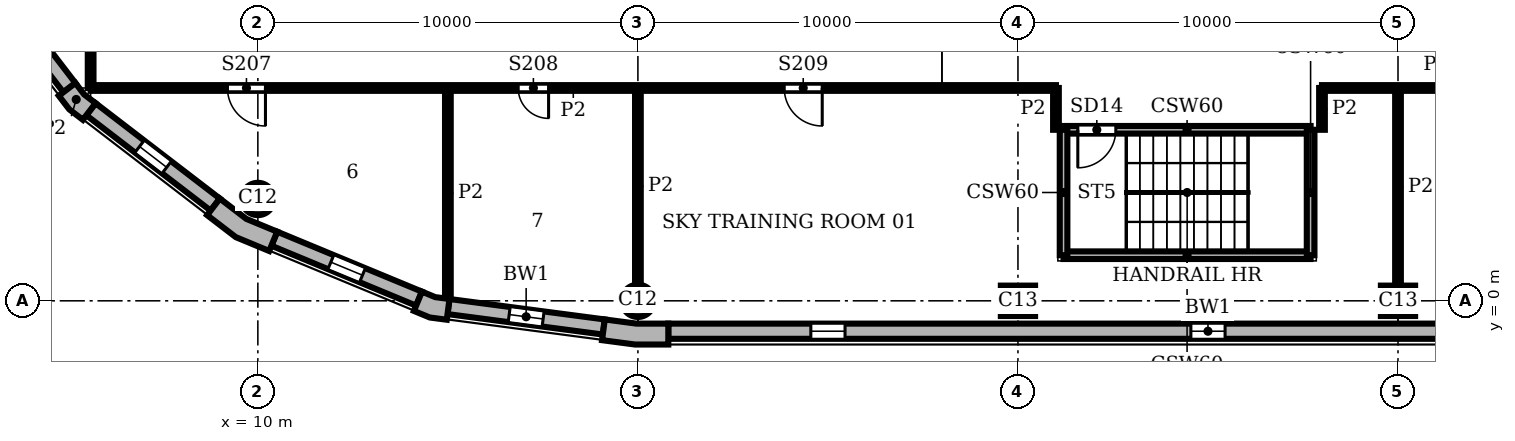
"""IFC4 building model, lengths in metres.
Left out: names, types, materials, properties, quantities, classifications, styles, units other than length and angle.
Written with IfcOpenShell. Run it as: python <this file> out.ifc"""

import sys

from ifc_helpers import new_model, si_unit, direction, frame, frame_2d, origin, origin_2d, place, context, subcontext, project, spatial, polyline, rectangle, circle, outline, extrude, element, fill, save


model = new_model("IFC4")
c1 = context("Model", 3, precision=1e-05, world=origin(), true_north=direction((0.0, 1.0)))
c2 = subcontext(c1, "Body", "Model", "MODEL_VIEW")
j1 = project(units=[si_unit("LENGTHUNIT", "METRE"), si_unit("PLANEANGLEUNIT", "RADIAN")], contexts=[c1])
p1 = place(None, origin())
s1 = spatial("IfcSite", under=j1, at=p1, CompositionType="ELEMENT")
p2 = place(p1, origin())
s2 = spatial("IfcBuilding", under=s1, at=p2, CompositionType="ELEMENT")
p3 = place(p2, frame((0.0, 0.0, 246.0)))
s3 = spatial("IfcBuildingStorey", under=s2, at=p3, CompositionType="ELEMENT", Elevation=246.0)
p4 = place(p3, frame((20.0, 0.0, 0.0), z_axis=(0.0, 0.0, 1.0), x_axis=(1.0, 0.0, 0.0)))
e1 = element("IfcColumn", 1, at=p4, inside=s3, PredefinedType="COLUMN", context=c2, shape_type="SweptSolid", body=[
    extrude(circle(Radius=0.425, at=origin_2d()), origin(), (0.0, 0.0, 1.0), 5.4),
])
for number, where, z_axis, x_axis in (
    (2, (30.0, 0.0, 0.0), (0.0, 0.0, 1.0), (1.0, 0.0, 0.0)),
    (3, (40.0, 0.0, 0.0), (0.0, 0.0, 1.0), (1.0, 0.0, 0.0)),
):
    element("IfcColumn", number, at=place(p3, frame(where, z_axis=z_axis, x_axis=x_axis)), inside=s3, PredefinedType="COLUMN", context=c2, shape_type="SweptSolid", body=[
        extrude(rectangle(XDim=0.9, YDim=0.8, at=origin_2d()), origin(), (0.0, 0.0, 1.0), 5.4),
    ])
p5 = place(p3, frame((10.0, 2.679, 0.0), z_axis=(0.0, 0.0, 1.0), x_axis=(1.0, 0.0, 0.0)))
e4 = element("IfcColumn", 4, at=p5, inside=s3, PredefinedType="COLUMN", context=c2, shape_type="SweptSolid", body=[
    extrude(circle(Radius=0.425, at=origin_2d()), origin(), (0.0, 0.0, 1.0), 5.4),
])
p6 = place(p3, origin())
e5 = element("IfcWall", 5, at=p6, inside=s3, PredefinedType="SOLIDWALL", context=c2, shape_type="SweptSolid", body=[
    extrude(outline(polyline([(19.076, -0.887), (19.057, -1.036), (19.925, -1.15), (20.8, -1.15), (20.8, -1.0), (20.8, -0.6), (19.961, -0.6), (19.128, -0.49), (19.076, -0.887)])), origin(), (0.0, 0.0, 1.0), 5.4),
])
e6 = element("IfcWall", 6, at=p6, inside=s3, PredefinedType="SOLIDWALL", context=c2, shape_type="SweptSolid", body=[
    extrude(outline(polyline([(4.882, 5.487), (4.763, 5.396), (5.038, 5.038), (5.396, 4.763), (5.487, 4.882), (5.731, 5.199), (5.43, 5.43), (5.199, 5.731), (4.882, 5.487)])), origin(), (0.0, 0.0, 1.0), 5.4),
])
e7 = element("IfcWall", 7, at=p6, inside=s3, PredefinedType="SOLIDWALL", context=c2, shape_type="SweptSolid", body=[
    extrude(outline(polyline([(8.757, 2.373), (8.665, 2.254), (9.42, 1.675), (10.299, 1.311), (10.356, 1.449), (10.51, 1.819), (9.698, 2.155), (9.0, 2.69), (8.757, 2.373)])), origin(), (0.0, 0.0, 1.0), 5.4),
])
e8 = element("IfcWall", 8, at=p6, inside=s3, PredefinedType="SOLIDWALL", context=c2, shape_type="SweptSolid", body=[
    extrude(outline(polyline([(14.164, -0.128), (14.106, -0.266), (14.523, -0.439), (14.971, -0.498), (14.99, -0.349), (15.043, 0.047), (14.667, 0.097), (14.317, 0.242), (14.164, -0.128)])), origin(), (0.0, 0.0, 1.0), 5.4),
])
p7 = place(p3, frame((20.8, -0.8, 0.0), z_axis=(0.0, 0.0, 1.0), x_axis=(1.0, 0.0, 0.0)))
e9 = element("IfcWall", 9, at=p7, inside=s3, PredefinedType="SOLIDWALL", context=c2, shape_type="SweptSolid", body=[
    extrude(rectangle(XDim=28.4, YDim=0.4, at=frame_2d((14.2, 0.0))), origin(), (0.0, 0.0, 1.0), 5.4),
])
p8 = place(p7, frame((3.75, 0.0, 0.9)))
e10 = element("IfcOpeningElement", 10, at=p8, cuts=e9, PredefinedType="OPENING", context=c2, shape_type="SweptSolid", body=[
    extrude(rectangle(XDim=0.9, YDim=3.4, at=frame_2d((0.45, 1.7))), frame((0.0, 0.21, 0.0), z_axis=(0.0, -1.0, 0.0), x_axis=(1.0, 0.0, 0.0)), (0.0, 0.0, 1.0), 0.42),
])
p9 = place(p7, frame((13.75, 0.0, 0.9)))
e11 = element("IfcOpeningElement", 11, at=p9, cuts=e9, PredefinedType="OPENING", context=c2, shape_type="SweptSolid", body=[
    extrude(rectangle(XDim=0.9, YDim=3.4, at=frame_2d((0.45, 1.7))), frame((0.0, 0.21, 0.0), z_axis=(0.0, -1.0, 0.0), x_axis=(1.0, 0.0, 0.0)), (0.0, 0.0, 1.0), 0.42),
])
p10 = place(p7, frame((23.75, 0.0, 0.9)))
e12 = element("IfcOpeningElement", 12, at=p10, cuts=e9, PredefinedType="OPENING", context=c2, shape_type="SweptSolid", body=[
    extrude(rectangle(XDim=0.9, YDim=3.4, at=frame_2d((0.45, 1.7))), frame((0.0, 0.21, 0.0), z_axis=(0.0, -1.0, 0.0), x_axis=(1.0, 0.0, 0.0)), (0.0, 0.0, 1.0), 0.42),
])
p11 = place(p3, frame((2.532, 8.878, 0.0), z_axis=(0.0, 0.0, 1.0), x_axis=(0.608759824817, -0.793354571229, 0.0)))
e13 = element("IfcWall", 13, at=p11, inside=s3, PredefinedType="SOLIDWALL", context=c2, shape_type="SweptSolid", body=[
    extrude(rectangle(XDim=4.121, YDim=0.4, at=frame_2d((2.061, 0.0))), origin(), (0.0, 0.0, 1.0), 5.4),
])
p12 = place(p11, frame((1.611, 0.0, 0.9)))
e14 = element("IfcOpeningElement", 14, at=p12, cuts=e13, PredefinedType="OPENING", context=c2, shape_type="SweptSolid", body=[
    extrude(rectangle(XDim=0.9, YDim=3.4, at=frame_2d((0.45, 1.7))), frame((0.0, 0.21, 0.0), z_axis=(0.0, -1.0, 0.0), x_axis=(1.0, 0.0, 0.0)), (0.0, 0.0, 1.0), 0.42),
])
p13 = place(p3, frame((5.609, 5.041, 0.0), z_axis=(0.0, 0.0, 1.0), x_axis=(0.793354571229, -0.608759824817, 0.0)))
e15 = element("IfcWall", 15, at=p13, inside=s3, PredefinedType="SOLIDWALL", context=c2, shape_type="SweptSolid", body=[
    extrude(rectangle(XDim=4.121, YDim=0.4, at=frame_2d((2.061, 0.0))), origin(), (0.0, 0.0, 1.0), 5.4),
])
p14 = place(p13, frame((1.611, 0.0, 0.9)))
e16 = element("IfcOpeningElement", 16, at=p14, cuts=e15, PredefinedType="OPENING", context=c2, shape_type="SweptSolid", body=[
    extrude(rectangle(XDim=0.9, YDim=3.4, at=frame_2d((0.45, 1.7))), frame((0.0, 0.21, 0.0), z_axis=(0.0, -1.0, 0.0), x_axis=(1.0, 0.0, 0.0)), (0.0, 0.0, 1.0), 0.42),
])
p15 = place(p3, frame((10.433, 1.634, 0.0), z_axis=(0.0, 0.0, 1.0), x_axis=(0.923863744394, -0.382721546029, 0.0)))
e17 = element("IfcWall", 17, at=p15, inside=s3, PredefinedType="SOLIDWALL", context=c2, shape_type="SweptSolid", body=[
    extrude(rectangle(XDim=4.121, YDim=0.4, at=frame_2d((2.061, 0.0))), origin(), (0.0, 0.0, 1.0), 5.4),
])
p16 = place(p15, frame((1.611, 0.0, 0.9)))
e18 = element("IfcOpeningElement", 18, at=p16, cuts=e17, PredefinedType="OPENING", context=c2, shape_type="SweptSolid", body=[
    extrude(rectangle(XDim=0.9, YDim=3.4, at=frame_2d((0.45, 1.7))), frame((0.0, 0.21, 0.0), z_axis=(0.0, -1.0, 0.0), x_axis=(1.0, 0.0, 0.0)), (0.0, 0.0, 1.0), 0.42),
])
p17 = place(p3, frame((15.017, -0.151, 0.0), z_axis=(0.0, 0.0, 1.0), x_axis=(0.991446429508, -0.130514280502, 0.0)))
e19 = element("IfcWall", 19, at=p17, inside=s3, PredefinedType="SOLIDWALL", context=c2, shape_type="SweptSolid", body=[
    extrude(rectangle(XDim=4.121, YDim=0.4, at=frame_2d((2.061, 0.0))), origin(), (0.0, 0.0, 1.0), 5.4),
])
p18 = place(p17, frame((1.611, 0.0, 0.9)))
e20 = element("IfcOpeningElement", 20, at=p18, cuts=e19, PredefinedType="OPENING", context=c2, shape_type="SweptSolid", body=[
    extrude(rectangle(XDim=0.9, YDim=3.4, at=frame_2d((0.45, 1.7))), frame((0.0, 0.21, 0.0), z_axis=(0.0, -1.0, 0.0), x_axis=(1.0, 0.0, 0.0)), (0.0, 0.0, 1.0), 0.42),
])
p19 = place(p3, frame((31.2, 1.2, 0.0), z_axis=(0.0, 0.0, 1.0), x_axis=(1.0, 0.0, 0.0)))
e21 = element("IfcWall", 21, at=p19, inside=s3, PredefinedType="SHEAR", context=c2, shape_type="SweptSolid", body=[
    extrude(rectangle(XDim=6.5, YDim=0.2, at=frame_2d((3.25, 0.0))), origin(), (0.0, 0.0, 1.0), 5.08),
])
p20 = place(p3, frame((31.2, 4.5, 0.0), z_axis=(0.0, 0.0, 1.0), x_axis=(1.0, 0.0, 0.0)))
e22 = element("IfcWall", 22, at=p20, inside=s3, PredefinedType="SHEAR", context=c2, shape_type="SweptSolid", body=[
    extrude(rectangle(XDim=6.5, YDim=0.2, at=frame_2d((3.25, 0.0))), origin(), (0.0, 0.0, 1.0), 5.08),
])
p21 = place(p20, frame((0.375, 0.0, 0.0)))
e23 = element("IfcOpeningElement", 23, at=p21, cuts=e22, PredefinedType="OPENING", context=c2, shape_type="SweptSolid", body=[
    extrude(rectangle(XDim=1.0, YDim=2.1, at=frame_2d((0.5, 1.05))), frame((0.0, 0.11, 0.0), z_axis=(0.0, -1.0, 0.0), x_axis=(1.0, 0.0, 0.0)), (0.0, 0.0, 1.0), 0.22),
])
for number, where, z_axis, x_axis in (
    (24, (31.2, 1.2, 0.0), (0.0, 0.0, 1.0), (0.0, 1.0, 0.0)),
    (25, (37.7, 1.2, 0.0), (0.0, 0.0, 1.0), (0.0, 1.0, 0.0)),
):
    element("IfcWall", number, at=place(p3, frame(where, z_axis=z_axis, x_axis=x_axis)), inside=s3, PredefinedType="SHEAR", context=c2, shape_type="SweptSolid", body=[
        extrude(rectangle(XDim=3.3, YDim=0.2, at=frame_2d((1.65, 0.0))), origin(), (0.0, 0.0, 1.0), 5.08),
    ])
p22 = place(p3, frame((5.6, 5.6, 0.0), z_axis=(0.0, 0.0, 1.0), x_axis=(0.0, 1.0, 0.0)))
e26 = element("IfcWall", 26, at=p22, inside=s3, PredefinedType="PARTITIONING", context=c2, shape_type="SweptSolid", body=[
    extrude(rectangle(XDim=22.4, YDim=0.15, at=frame_2d((11.2, 0.0))), origin(), (0.0, 0.0, 1.0), 5.08),
])
p23 = place(p22, frame((5.35, 0.0, 0.0)))
e27 = element("IfcOpeningElement", 27, at=p23, cuts=e26, PredefinedType="OPENING", context=c2, shape_type="SweptSolid", body=[
    extrude(rectangle(XDim=1.0, YDim=2.1, at=frame_2d((0.5, 1.05))), frame((0.0, 0.085, 0.0), z_axis=(0.0, -1.0, 0.0), x_axis=(1.0, 0.0, 0.0)), (0.0, 0.0, 1.0), 0.17),
])
p24 = place(p22, frame((11.25, 0.0, 0.0)))
e28 = element("IfcOpeningElement", 28, at=p24, cuts=e26, PredefinedType="OPENING", context=c2, shape_type="SweptSolid", body=[
    extrude(rectangle(XDim=0.8, YDim=2.1, at=frame_2d((0.4, 1.05))), frame((0.0, 0.085, 0.0), z_axis=(0.0, -1.0, 0.0), x_axis=(1.0, 0.0, 0.0)), (0.0, 0.0, 1.0), 0.17),
])
p25 = place(p22, frame((18.25, 0.0, 0.0)))
e29 = element("IfcOpeningElement", 29, at=p25, cuts=e26, PredefinedType="OPENING", context=c2, shape_type="SweptSolid", body=[
    extrude(rectangle(XDim=1.8, YDim=2.1, at=frame_2d((0.9, 1.05))), frame((0.0, 0.085, 0.0), z_axis=(0.0, -1.0, 0.0), x_axis=(1.0, 0.0, 0.0)), (0.0, 0.0, 1.0), 0.17),
])
p26 = place(p3, frame((15.0, 0.063, 0.0), z_axis=(0.0, 0.0, 1.0), x_axis=(0.0, 1.0, 0.0)))
e30 = element("IfcWall", 30, at=p26, inside=s3, PredefinedType="PARTITIONING", context=c2, shape_type="SweptSolid", body=[
    extrude(rectangle(XDim=5.537, YDim=0.15, at=frame_2d((2.769, 0.0))), origin(), (0.0, 0.0, 1.0), 5.08),
])
p27 = place(p3, frame((20.0, 0.425, 0.0), z_axis=(0.0, 0.0, 1.0), x_axis=(0.0, 1.0, 0.0)))
e31 = element("IfcWall", 31, at=p27, inside=s3, PredefinedType="PARTITIONING", context=c2, shape_type="SweptSolid", body=[
    extrude(rectangle(XDim=5.175, YDim=0.15, at=frame_2d((2.587, 0.0))), origin(), (0.0, 0.0, 1.0), 5.08),
])
for number, where, z_axis, x_axis in (
    (32, (31.0, 4.5, 0.0), (0.0, 0.0, 1.0), (0.0, 1.0, 0.0)),
    (33, (38.0, 4.5, 0.0), (0.0, 0.0, 1.0), (0.0, 1.0, 0.0)),
):
    element("IfcWall", number, at=place(p3, frame(where, z_axis=z_axis, x_axis=x_axis)), inside=s3, PredefinedType="PARTITIONING", context=c2, shape_type="SweptSolid", body=[
        extrude(rectangle(XDim=1.1, YDim=0.15, at=frame_2d((0.55, 0.0))), origin(), (0.0, 0.0, 1.0), 5.08),
    ])
p28 = place(p3, frame((40.0, 0.4, 0.0), z_axis=(0.0, 0.0, 1.0), x_axis=(0.0, 1.0, 0.0)))
e34 = element("IfcWall", 34, at=p28, inside=s3, PredefinedType="PARTITIONING", context=c2, shape_type="SweptSolid", body=[
    extrude(rectangle(XDim=5.2, YDim=0.15, at=frame_2d((2.6, 0.0))), origin(), (0.0, 0.0, 1.0), 5.08),
])
p29 = place(p3, frame((5.6, 5.6, 0.0), z_axis=(0.0, 0.0, 1.0), x_axis=(1.0, 0.0, 0.0)))
e35 = element("IfcWall", 35, at=p29, inside=s3, PredefinedType="PARTITIONING", context=c2, shape_type="SweptSolid", body=[
    extrude(rectangle(XDim=25.4, YDim=0.15, at=frame_2d((12.7, 0.0))), origin(), (0.0, 0.0, 1.0), 5.08),
])
p30 = place(p29, frame((3.6, 0.0, 0.0)))
e36 = element("IfcOpeningElement", 36, at=p30, cuts=e35, PredefinedType="OPENING", context=c2, shape_type="SweptSolid", body=[
    extrude(rectangle(XDim=1.0, YDim=2.1, at=frame_2d((0.5, 1.05))), frame((0.0, 0.085, 0.0), z_axis=(0.0, -1.0, 0.0), x_axis=(1.0, 0.0, 0.0)), (0.0, 0.0, 1.0), 0.17),
])
p31 = place(p29, frame((11.25, 0.0, 0.0)))
e37 = element("IfcOpeningElement", 37, at=p31, cuts=e35, PredefinedType="OPENING", context=c2, shape_type="SweptSolid", body=[
    extrude(rectangle(XDim=0.8, YDim=2.1, at=frame_2d((0.4, 1.05))), frame((0.0, 0.085, 0.0), z_axis=(0.0, -1.0, 0.0), x_axis=(1.0, 0.0, 0.0)), (0.0, 0.0, 1.0), 0.17),
])
p32 = place(p29, frame((18.25, 0.0, 0.0)))
e38 = element("IfcOpeningElement", 38, at=p32, cuts=e35, PredefinedType="OPENING", context=c2, shape_type="SweptSolid", body=[
    extrude(rectangle(XDim=1.0, YDim=2.1, at=frame_2d((0.5, 1.05))), frame((0.0, 0.085, 0.0), z_axis=(0.0, -1.0, 0.0), x_axis=(1.0, 0.0, 0.0)), (0.0, 0.0, 1.0), 0.17),
])
p33 = place(p3, frame((38.0, 5.6, 0.0), z_axis=(0.0, 0.0, 1.0), x_axis=(1.0, 0.0, 0.0)))
e39 = element("IfcWall", 39, at=p33, inside=s3, PredefinedType="PARTITIONING", context=c2, shape_type="SweptSolid", body=[
    extrude(rectangle(XDim=6.0, YDim=0.15, at=frame_2d((3.0, 0.0))), origin(), (0.0, 0.0, 1.0), 5.08),
])
p34 = place(p8, origin())
e40 = element("IfcWindow", 40, at=p34, inside=s3, PartitioningType="SINGLE_PANEL", PredefinedType="WINDOW", context=c2, shape_type="SweptSolid", body=[
    extrude(rectangle(XDim=0.9, YDim=3.4, at=frame_2d((0.45, 1.7))), frame((0.0, 0.16, 0.0), z_axis=(0.0, -1.0, 0.0), x_axis=(1.0, 0.0, 0.0)), (0.0, 0.0, 1.0), 0.06),
])
fill(e10, e40)
p35 = place(p9, origin())
e41 = element("IfcWindow", 41, at=p35, inside=s3, PartitioningType="SINGLE_PANEL", PredefinedType="WINDOW", context=c2, shape_type="SweptSolid", body=[
    extrude(rectangle(XDim=0.9, YDim=3.4, at=frame_2d((0.45, 1.7))), frame((0.0, 0.16, 0.0), z_axis=(0.0, -1.0, 0.0), x_axis=(1.0, 0.0, 0.0)), (0.0, 0.0, 1.0), 0.06),
])
fill(e11, e41)
p36 = place(p14, origin())
e42 = element("IfcWindow", 42, at=p36, inside=s3, PartitioningType="SINGLE_PANEL", PredefinedType="WINDOW", context=c2, shape_type="SweptSolid", body=[
    extrude(rectangle(XDim=0.9, YDim=3.4, at=frame_2d((0.45, 1.7))), frame((0.0, 0.16, 0.0), z_axis=(0.0, -1.0, 0.0), x_axis=(1.0, 0.0, 0.0)), (0.0, 0.0, 1.0), 0.06),
])
fill(e16, e42)
p37 = place(p16, origin())
e43 = element("IfcWindow", 43, at=p37, inside=s3, PartitioningType="SINGLE_PANEL", PredefinedType="WINDOW", context=c2, shape_type="SweptSolid", body=[
    extrude(rectangle(XDim=0.9, YDim=3.4, at=frame_2d((0.45, 1.7))), frame((0.0, 0.16, 0.0), z_axis=(0.0, -1.0, 0.0), x_axis=(1.0, 0.0, 0.0)), (0.0, 0.0, 1.0), 0.06),
])
fill(e18, e43)
p38 = place(p18, origin())
e44 = element("IfcWindow", 44, at=p38, inside=s3, PartitioningType="SINGLE_PANEL", PredefinedType="WINDOW", context=c2, shape_type="SweptSolid", body=[
    extrude(rectangle(XDim=0.9, YDim=3.4, at=frame_2d((0.45, 1.7))), frame((0.0, 0.16, 0.0), z_axis=(0.0, -1.0, 0.0), x_axis=(1.0, 0.0, 0.0)), (0.0, 0.0, 1.0), 0.06),
])
fill(e20, e44)
p39 = place(p21, frame((1.0, 0.0, 0.0), z_axis=(0.0, 0.0, 1.0), x_axis=(-1.0, 0.0, 0.0)))
e45 = element("IfcDoor", 45, at=p39, inside=s3, OperationType="SINGLE_SWING_RIGHT", PredefinedType="DOOR", context=c2, shape_type="SweptSolid", body=[
    extrude(rectangle(XDim=1.0, YDim=2.1, at=frame_2d((0.5, 1.05))), frame((0.0, 0.025, 0.0), z_axis=(0.0, -1.0, 0.0), x_axis=(1.0, 0.0, 0.0)), (0.0, 0.0, 1.0), 0.05),
])
fill(e23, e45)
p40 = place(p30, frame((1.0, 0.0, 0.0), z_axis=(0.0, 0.0, 1.0), x_axis=(-1.0, 0.0, 0.0)))
e46 = element("IfcDoor", 46, at=p40, inside=s3, OperationType="SINGLE_SWING_LEFT", PredefinedType="DOOR", context=c2, shape_type="SweptSolid", body=[
    extrude(rectangle(XDim=1.0, YDim=2.1, at=frame_2d((0.5, 1.05))), frame((0.0, 0.025, 0.0), z_axis=(0.0, -1.0, 0.0), x_axis=(1.0, 0.0, 0.0)), (0.0, 0.0, 1.0), 0.05),
])
fill(e36, e46)
p41 = place(p31, frame((0.8, 0.0, 0.0), z_axis=(0.0, 0.0, 1.0), x_axis=(-1.0, 0.0, 0.0)))
e47 = element("IfcDoor", 47, at=p41, inside=s3, OperationType="SINGLE_SWING_LEFT", PredefinedType="DOOR", context=c2, shape_type="SweptSolid", body=[
    extrude(rectangle(XDim=0.8, YDim=2.1, at=frame_2d((0.4, 1.05))), frame((0.0, 0.025, 0.0), z_axis=(0.0, -1.0, 0.0), x_axis=(1.0, 0.0, 0.0)), (0.0, 0.0, 1.0), 0.05),
])
fill(e37, e47)
p42 = place(p32, frame((1.0, 0.0, 0.0), z_axis=(0.0, 0.0, 1.0), x_axis=(-1.0, 0.0, 0.0)))
e48 = element("IfcDoor", 48, at=p42, inside=s3, OperationType="SINGLE_SWING_LEFT", PredefinedType="DOOR", context=c2, shape_type="SweptSolid", body=[
    extrude(rectangle(XDim=1.0, YDim=2.1, at=frame_2d((0.5, 1.05))), frame((0.0, 0.025, 0.0), z_axis=(0.0, -1.0, 0.0), x_axis=(1.0, 0.0, 0.0)), (0.0, 0.0, 1.0), 0.05),
])
fill(e38, e48)
save(model, sys.argv[1])
